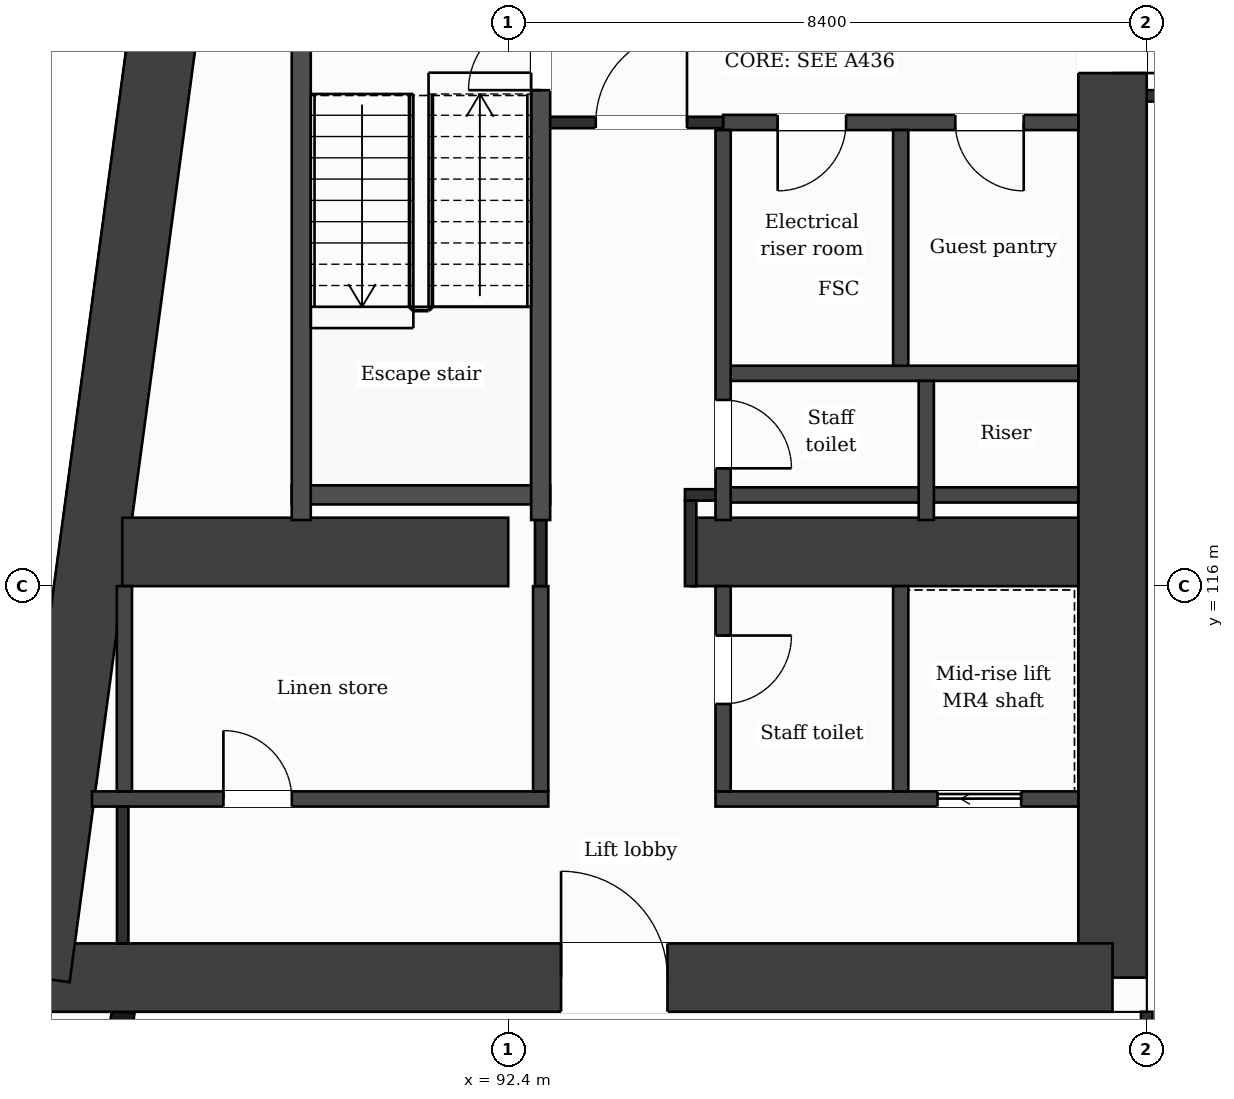
"""IFC4 building model, lengths in metres.
Left out: names, types, materials, properties, quantities, classifications, styles, units other than length and angle.
Written with IfcOpenShell. Run it as: python <this file> out.ifc"""

import sys

from ifc_helpers import new_model, si_unit, direction, frame, frame_2d, origin, place, context, subcontext, project, spatial, rectangle, extrude, element, fill, save


model = new_model("IFC4")
c1 = context("Model", 3, precision=1e-05, world=origin(), true_north=direction((0.0, 1.0)))
c2 = subcontext(c1, "Body", "Model", "MODEL_VIEW")
j1 = project(units=[si_unit("LENGTHUNIT", "METRE"), si_unit("PLANEANGLEUNIT", "RADIAN")], contexts=[c1])
p1 = place(None, origin())
s1 = spatial("IfcSite", under=j1, at=p1, CompositionType="ELEMENT")
p2 = place(p1, origin())
s2 = spatial("IfcBuilding", under=s1, at=p2, CompositionType="ELEMENT")
p3 = place(p2, frame((0.0, 0.0, 151.5)))
s3 = spatial("IfcBuildingStorey", under=s2, at=p3, CompositionType="ELEMENT", Elevation=151.5)
p4 = place(p3, frame((100.35, 131.95, 0.0), z_axis=(0.0, 0.0, 1.0), x_axis=(0.0, -1.0, 0.0)))
e1 = element("IfcWall", 1, at=p4, inside=s3, PredefinedType="SHEAR", context=c2, shape_type="SweptSolid", body=[
    extrude(rectangle(XDim=21.1, YDim=0.9, at=frame_2d((10.55, 0.0))), origin(), (0.0, 0.0, 1.0), 3.7),
])
p5 = place(p4, frame((7.8, 0.0, 0.0)))
e2 = element("IfcOpeningElement", 2, at=p5, cuts=e1, PredefinedType="OPENING", context=c2, shape_type="SweptSolid", body=[
    extrude(rectangle(XDim=1.4, YDim=2.1, at=frame_2d((0.7, 1.05))), frame((0.0, 0.46, 0.0), z_axis=(0.0, -1.0, 0.0), x_axis=(1.0, 0.0, 0.0)), (0.0, 0.0, 1.0), 0.92),
])
p6 = place(p3, frame((100.35, 110.85, 0.0), z_axis=(0.0, 0.0, 1.0), x_axis=(-1.0, 0.0, 0.0)))
e3 = element("IfcWall", 3, at=p6, inside=s3, PredefinedType="SHEAR", context=c2, shape_type="SweptSolid", body=[
    extrude(rectangle(XDim=14.166, YDim=0.9, at=frame_2d((7.083, 0.0))), origin(), (0.0, 0.0, 1.0), 3.7),
])
p7 = place(p6, frame((5.855, 0.0, 0.0)))
e4 = element("IfcOpeningElement", 4, at=p7, cuts=e3, PredefinedType="OPENING", context=c2, shape_type="SweptSolid", body=[
    extrude(rectangle(XDim=1.4, YDim=2.1, at=frame_2d((0.7, 1.05))), frame((0.0, 0.46, 0.0), z_axis=(0.0, -1.0, 0.0), x_axis=(1.0, 0.0, 0.0)), (0.0, 0.0, 1.0), 0.92),
])
p8 = place(p3, frame((86.184, 110.85, 0.0), z_axis=(0.0, 0.0, 1.0), x_axis=(0.133410495943, 0.991060865725, 0.0)))
e5 = element("IfcWall", 5, at=p8, inside=s3, PredefinedType="SHEAR", context=c2, shape_type="SweptSolid", body=[
    extrude(rectangle(XDim=21.29, YDim=0.9, at=frame_2d((10.645, 0.0))), origin(), (0.0, 0.0, 1.0), 3.7),
])
p9 = place(p3, frame((87.323, 116.45, 0.0), z_axis=(0.0, 0.0, 1.0), x_axis=(1.0, 0.0, 0.0)))
e6 = element("IfcWall", 6, at=p9, inside=s3, PredefinedType="SHEAR", context=c2, shape_type="SweptSolid", body=[
    extrude(rectangle(XDim=5.077, YDim=0.9, at=frame_2d((2.539, 0.0))), origin(), (0.0, 0.0, 1.0), 3.7),
])
p10 = place(p3, frame((94.8, 116.45, 0.0), z_axis=(0.0, 0.0, 1.0), x_axis=(1.0, 0.0, 0.0)))
e7 = element("IfcWall", 7, at=p10, inside=s3, PredefinedType="SHEAR", context=c2, shape_type="SweptSolid", body=[
    extrude(rectangle(XDim=5.1, YDim=0.9, at=frame_2d((2.55, 0.0))), origin(), (0.0, 0.0, 1.0), 3.7),
])
p11 = place(p3, frame((87.334, 110.4, 0.0), z_axis=(0.0, 0.0, 1.0), x_axis=(-0.133437175554, -0.991057273915, 0.0)))
e8 = element("IfcWall", 8, at=p11, inside=s3, PredefinedType="SOLIDWALL", context=c2, shape_type="SweptSolid", body=[
    extrude(rectangle(XDim=6.781, YDim=0.3, at=frame_2d((3.39, 0.0))), origin(), (0.0, 0.0, 1.0), 3.38),
])
p12 = place(p11, frame((1.418, 0.0, 0.0)))
e9 = element("IfcOpeningElement", 9, at=p12, cuts=e8, PredefinedType="OPENING", context=c2, shape_type="SweptSolid", body=[
    extrude(rectangle(XDim=1.2, YDim=2.4, at=frame_2d((0.6, 1.2))), frame((0.0, 0.16, 0.0), z_axis=(0.0, -1.0, 0.0), x_axis=(1.0, 0.0, 0.0)), (0.0, 0.0, 1.0), 0.32),
])
p13 = place(p11, frame((4.758, 0.0, 0.9)))
e10 = element("IfcOpeningElement", 10, at=p13, cuts=e8, PredefinedType="OPENING", context=c2, shape_type="SweptSolid", body=[
    extrude(rectangle(XDim=1.2, YDim=2.1, at=frame_2d((0.6, 1.05))), frame((0.0, 0.16, 0.0), z_axis=(0.0, -1.0, 0.0), x_axis=(1.0, 0.0, 0.0)), (0.0, 0.0, 1.0), 0.32),
])
p14 = place(p3, frame((86.924, 113.2, 0.0), z_axis=(0.0, 0.0, 1.0), x_axis=(1.0, 0.0, 0.0)))
e11 = element("IfcWall", 11, at=p14, inside=s3, PredefinedType="PARTITIONING", context=c2, shape_type="SweptSolid", body=[
    extrude(rectangle(XDim=6.003, YDim=0.2, at=frame_2d((3.001, 0.0))), origin(), (0.0, 0.0, 1.0), 3.38),
])
p15 = place(p14, frame((1.729, 0.0, 0.0)))
e12 = element("IfcOpeningElement", 12, at=p15, cuts=e11, PredefinedType="OPENING", context=c2, shape_type="SweptSolid", body=[
    extrude(rectangle(XDim=0.9, YDim=2.1, at=frame_2d((0.45, 1.05))), frame((0.0, 0.11, 0.0), z_axis=(0.0, -1.0, 0.0), x_axis=(1.0, 0.0, 0.0)), (0.0, 0.0, 1.0), 0.22),
])
p16 = place(p3, frame((95.127, 113.2, 0.0), z_axis=(0.0, 0.0, 1.0), x_axis=(1.0, 0.0, 0.0)))
e13 = element("IfcWall", 13, at=p16, inside=s3, PredefinedType="PARTITIONING", context=c2, shape_type="SweptSolid", body=[
    extrude(rectangle(XDim=4.773, YDim=0.2, at=frame_2d((2.386, 0.0))), origin(), (0.0, 0.0, 1.0), 3.38),
])
p17 = place(p16, frame((2.921, 0.0, 0.0)))
e14 = element("IfcOpeningElement", 14, at=p17, cuts=e13, PredefinedType="OPENING", context=c2, shape_type="SweptSolid", body=[
    extrude(rectangle(XDim=1.1, YDim=2.1, at=frame_2d((0.55, 1.05))), frame((0.0, 0.11, 0.0), z_axis=(0.0, -1.0, 0.0), x_axis=(1.0, 0.0, 0.0)), (0.0, 0.0, 1.0), 0.22),
])
p18 = place(p3, frame((95.227, 117.2, 0.0), z_axis=(0.0, 0.0, 1.0), x_axis=(1.0, 0.0, 0.0)))
e15 = element("IfcWall", 15, at=p18, inside=s3, PredefinedType="PARTITIONING", context=c2, shape_type="SweptSolid", body=[
    extrude(rectangle(XDim=4.673, YDim=0.2, at=frame_2d((2.336, 0.0))), origin(), (0.0, 0.0, 1.0), 3.38),
])
p19 = place(p3, frame((94.725, 117.2, 0.0), z_axis=(0.0, 0.0, 1.0), x_axis=(1.0, 0.0, 0.0)))
e16 = element("IfcWall", 16, at=p19, inside=s3, PredefinedType="PARTITIONING", context=c2, shape_type="SweptSolid", body=[
    extrude(rectangle(XDim=0.502, YDim=0.15, at=frame_2d((0.251, 0.0))), origin(), (0.0, 0.0, 1.0), 3.38),
])
p20 = place(p3, frame((89.552, 117.2, 0.0), z_axis=(0.0, 0.0, 1.0), x_axis=(1.0, 0.0, 0.0)))
e17 = element("IfcWall", 17, at=p20, inside=s3, PredefinedType="PARTITIONING", context=c2, shape_type="SweptSolid", body=[
    extrude(rectangle(XDim=3.4, YDim=0.25, at=frame_2d((1.7, 0.0))), origin(), (0.0, 0.0, 1.0), 3.38),
])
p21 = place(p3, frame((95.227, 118.8, 0.0), z_axis=(0.0, 0.0, 1.0), x_axis=(1.0, 0.0, 0.0)))
e18 = element("IfcWall", 18, at=p21, inside=s3, PredefinedType="PARTITIONING", context=c2, shape_type="SweptSolid", body=[
    extrude(rectangle(XDim=4.673, YDim=0.2, at=frame_2d((2.336, 0.0))), origin(), (0.0, 0.0, 1.0), 3.38),
])
p22 = place(p3, frame((95.227, 122.1, 0.0), z_axis=(0.0, 0.0, 1.0), x_axis=(1.0, 0.0, 0.0)))
e19 = element("IfcWall", 19, at=p22, inside=s3, PredefinedType="PARTITIONING", context=c2, shape_type="SweptSolid", body=[
    extrude(rectangle(XDim=4.673, YDim=0.2, at=frame_2d((2.336, 0.0))), origin(), (0.0, 0.0, 1.0), 3.38),
])
p23 = place(p22, frame((0.718, 0.0, 0.0)))
e20 = element("IfcOpeningElement", 20, at=p23, cuts=e19, PredefinedType="OPENING", context=c2, shape_type="SweptSolid", body=[
    extrude(rectangle(XDim=0.9, YDim=2.1, at=frame_2d((0.45, 1.05))), frame((0.0, 0.11, 0.0), z_axis=(0.0, -1.0, 0.0), x_axis=(1.0, 0.0, 0.0)), (0.0, 0.0, 1.0), 0.22),
])
p24 = place(p22, frame((3.055, 0.0, 0.0)))
e21 = element("IfcOpeningElement", 21, at=p24, cuts=e19, PredefinedType="OPENING", context=c2, shape_type="SweptSolid", body=[
    extrude(rectangle(XDim=0.9, YDim=2.1, at=frame_2d((0.45, 1.05))), frame((0.0, 0.11, 0.0), z_axis=(0.0, -1.0, 0.0), x_axis=(1.0, 0.0, 0.0)), (0.0, 0.0, 1.0), 0.22),
])
p25 = place(p3, frame((92.827, 122.1, 0.0), z_axis=(0.0, 0.0, 1.0), x_axis=(1.0, 0.0, 0.0)))
e22 = element("IfcWall", 22, at=p25, inside=s3, PredefinedType="PARTITIONING", context=c2, shape_type="SweptSolid", body=[
    extrude(rectangle(XDim=2.4, YDim=0.15, at=frame_2d((1.2, 0.0))), origin(), (0.0, 0.0, 1.0), 3.38),
])
p26 = place(p25, frame((0.725, 0.0, 0.0)))
e23 = element("IfcOpeningElement", 23, at=p26, cuts=e22, PredefinedType="OPENING", context=c2, shape_type="SweptSolid", body=[
    extrude(rectangle(XDim=1.2, YDim=2.1, at=frame_2d((0.6, 1.05))), frame((0.0, 0.085, 0.0), z_axis=(0.0, -1.0, 0.0), x_axis=(1.0, 0.0, 0.0)), (0.0, 0.0, 1.0), 0.17),
])
p27 = place(p3, frame((100.8, 122.45, 0.0), z_axis=(0.0, 0.0, 1.0), x_axis=(1.0, 0.0, 0.0)))
e24 = element("IfcWall", 24, at=p27, inside=s3, PredefinedType="PARTITIONING", context=c2, shape_type="SweptSolid", body=[
    extrude(rectangle(XDim=25.2, YDim=0.15, at=frame_2d((12.6, 0.0))), origin(), (0.0, 0.0, 1.0), 3.38),
])
p28 = place(p3, frame((87.35, 113.3, 0.0), z_axis=(0.0, 0.0, 1.0), x_axis=(0.0, 1.0, 0.0)))
e25 = element("IfcWall", 25, at=p28, inside=s3, PredefinedType="PARTITIONING", context=c2, shape_type="SweptSolid", body=[
    extrude(rectangle(XDim=2.7, YDim=0.2, at=frame_2d((1.35, 0.0))), origin(), (0.0, 0.0, 1.0), 3.38),
])
p29 = place(p3, frame((87.328, 111.3, 0.0), z_axis=(0.0, 0.0, 1.0), x_axis=(0.0, 1.0, 0.0)))
e26 = element("IfcWall", 26, at=p29, inside=s3, PredefinedType="PARTITIONING", context=c2, shape_type="SweptSolid", body=[
    extrude(rectangle(XDim=1.8, YDim=0.15, at=frame_2d((0.9, 0.0))), origin(), (0.0, 0.0, 1.0), 3.38),
])
p30 = place(p3, frame((89.677, 116.87, 0.0), z_axis=(0.0, 0.0, 1.0), x_axis=(0.0, 1.0, 0.0)))
e27 = element("IfcWall", 27, at=p30, inside=s3, PredefinedType="PARTITIONING", context=c2, shape_type="SweptSolid", body=[
    extrude(rectangle(XDim=6.955, YDim=0.25, at=frame_2d((3.478, 0.0))), origin(), (0.0, 0.0, 1.0), 3.38),
])
p31 = place(p3, frame((92.827, 113.3, 0.0), z_axis=(0.0, 0.0, 1.0), x_axis=(0.0, 1.0, 0.0)))
e28 = element("IfcWall", 28, at=p31, inside=s3, PredefinedType="PARTITIONING", context=c2, shape_type="SweptSolid", body=[
    extrude(rectangle(XDim=2.7, YDim=0.2, at=frame_2d((1.35, 0.0))), origin(), (0.0, 0.0, 1.0), 3.38),
])
p32 = place(p3, frame((92.827, 116.0, 0.0), z_axis=(0.0, 0.0, 1.0), x_axis=(0.0, 1.0, 0.0)))
e29 = element("IfcWall", 29, at=p32, inside=s3, PredefinedType="PARTITIONING", context=c2, shape_type="SweptSolid", body=[
    extrude(rectangle(XDim=0.87, YDim=0.15, at=frame_2d((0.435, 0.0))), origin(), (0.0, 0.0, 1.0), 3.38),
])
p33 = place(p3, frame((92.827, 116.87, 0.0), z_axis=(0.0, 0.0, 1.0), x_axis=(0.0, 1.0, 0.0)))
e30 = element("IfcWall", 30, at=p33, inside=s3, PredefinedType="PARTITIONING", context=c2, shape_type="SweptSolid", body=[
    extrude(rectangle(XDim=6.955, YDim=0.25, at=frame_2d((3.478, 0.0))), origin(), (0.0, 0.0, 1.0), 3.38),
])
p34 = place(p33, frame((5.655, 0.0, 0.0)))
e31 = element("IfcOpeningElement", 31, at=p34, cuts=e30, PredefinedType="OPENING", context=c2, shape_type="SweptSolid", body=[
    extrude(rectangle(XDim=0.95, YDim=2.1, at=frame_2d((0.475, 1.05))), frame((0.0, 0.135, 0.0), z_axis=(0.0, -1.0, 0.0), x_axis=(1.0, 0.0, 0.0)), (0.0, 0.0, 1.0), 0.27),
])
p35 = place(p3, frame((94.8, 116.0, 0.0), z_axis=(0.0, 0.0, 1.0), x_axis=(0.0, 1.0, 0.0)))
e32 = element("IfcWall", 32, at=p35, inside=s3, PredefinedType="PARTITIONING", context=c2, shape_type="SweptSolid", body=[
    extrude(rectangle(XDim=1.125, YDim=0.15, at=frame_2d((0.562, 0.0))), origin(), (0.0, 0.0, 1.0), 3.38),
])
p36 = place(p3, frame((95.227, 113.3, 0.0), z_axis=(0.0, 0.0, 1.0), x_axis=(0.0, 1.0, 0.0)))
e33 = element("IfcWall", 33, at=p36, inside=s3, PredefinedType="PARTITIONING", context=c2, shape_type="SweptSolid", body=[
    extrude(rectangle(XDim=2.7, YDim=0.2, at=frame_2d((1.35, 0.0))), origin(), (0.0, 0.0, 1.0), 3.38),
])
p37 = place(p36, frame((1.15, 0.0, 0.0)))
e34 = element("IfcOpeningElement", 34, at=p37, cuts=e33, PredefinedType="OPENING", context=c2, shape_type="SweptSolid", body=[
    extrude(rectangle(XDim=0.9, YDim=2.1, at=frame_2d((0.45, 1.05))), frame((0.0, 0.11, 0.0), z_axis=(0.0, -1.0, 0.0), x_axis=(1.0, 0.0, 0.0)), (0.0, 0.0, 1.0), 0.22),
])
p38 = place(p3, frame((95.227, 116.87, 0.0), z_axis=(0.0, 0.0, 1.0), x_axis=(0.0, 1.0, 0.0)))
e35 = element("IfcWall", 35, at=p38, inside=s3, PredefinedType="PARTITIONING", context=c2, shape_type="SweptSolid", body=[
    extrude(rectangle(XDim=5.13, YDim=0.2, at=frame_2d((2.565, 0.0))), origin(), (0.0, 0.0, 1.0), 3.38),
])
p39 = place(p38, frame((0.68, 0.0, 0.0)))
e36 = element("IfcOpeningElement", 36, at=p39, cuts=e35, PredefinedType="OPENING", context=c2, shape_type="SweptSolid", body=[
    extrude(rectangle(XDim=0.9, YDim=2.1, at=frame_2d((0.45, 1.05))), frame((0.0, 0.11, 0.0), z_axis=(0.0, -1.0, 0.0), x_axis=(1.0, 0.0, 0.0)), (0.0, 0.0, 1.0), 0.22),
])
p40 = place(p3, frame((97.563, 113.3, 0.0), z_axis=(0.0, 0.0, 1.0), x_axis=(0.0, 1.0, 0.0)))
e37 = element("IfcWall", 37, at=p40, inside=s3, PredefinedType="PARTITIONING", context=c2, shape_type="SweptSolid", body=[
    extrude(rectangle(XDim=2.7, YDim=0.2, at=frame_2d((1.35, 0.0))), origin(), (0.0, 0.0, 1.0), 3.38),
])
p41 = place(p3, frame((97.563, 118.9, 0.0), z_axis=(0.0, 0.0, 1.0), x_axis=(0.0, 1.0, 0.0)))
e38 = element("IfcWall", 38, at=p41, inside=s3, PredefinedType="PARTITIONING", context=c2, shape_type="SweptSolid", body=[
    extrude(rectangle(XDim=3.1, YDim=0.2, at=frame_2d((1.55, 0.0))), origin(), (0.0, 0.0, 1.0), 3.38),
])
p42 = place(p3, frame((97.9, 116.87, 0.0), z_axis=(0.0, 0.0, 1.0), x_axis=(0.0, 1.0, 0.0)))
e39 = element("IfcWall", 39, at=p42, inside=s3, PredefinedType="PARTITIONING", context=c2, shape_type="SweptSolid", body=[
    extrude(rectangle(XDim=1.83, YDim=0.2, at=frame_2d((0.915, 0.0))), origin(), (0.0, 0.0, 1.0), 3.38),
])
p43 = place(p3, frame((100.8, 109.075, 0.0), z_axis=(0.0, 0.0, 1.0), x_axis=(0.0, 1.0, 0.0)))
e40 = element("IfcWall", 40, at=p43, inside=s3, PredefinedType="PARTITIONING", context=c2, shape_type="SweptSolid", body=[
    extrude(rectangle(XDim=1.325, YDim=0.15, at=frame_2d((0.663, 0.0))), origin(), (0.0, 0.0, 1.0), 3.38),
])
p44 = place(p26, origin())
e41 = element("IfcDoor", 41, at=p44, inside=s3, OperationType="SINGLE_SWING_RIGHT", PredefinedType="DOOR", context=c2, shape_type="SweptSolid", body=[
    extrude(rectangle(XDim=1.2, YDim=2.1, at=frame_2d((0.6, 1.05))), frame((0.0, 0.025, 0.0), z_axis=(0.0, -1.0, 0.0), x_axis=(1.0, 0.0, 0.0)), (0.0, 0.0, 1.0), 0.05),
])
fill(e23, e41)
p45 = place(p23, origin())
e42 = element("IfcDoor", 42, at=p45, inside=s3, OperationType="SINGLE_SWING_LEFT", PredefinedType="DOOR", context=c2, shape_type="SweptSolid", body=[
    extrude(rectangle(XDim=0.9, YDim=2.1, at=frame_2d((0.45, 1.05))), frame((0.0, 0.025, 0.0), z_axis=(0.0, -1.0, 0.0), x_axis=(1.0, 0.0, 0.0)), (0.0, 0.0, 1.0), 0.05),
])
fill(e20, e42)
p46 = place(p24, origin())
e43 = element("IfcDoor", 43, at=p46, inside=s3, OperationType="SINGLE_SWING_RIGHT", PredefinedType="DOOR", context=c2, shape_type="SweptSolid", body=[
    extrude(rectangle(XDim=0.9, YDim=2.1, at=frame_2d((0.45, 1.05))), frame((0.0, 0.025, 0.0), z_axis=(0.0, -1.0, 0.0), x_axis=(1.0, 0.0, 0.0)), (0.0, 0.0, 1.0), 0.05),
])
fill(e21, e43)
p47 = place(p34, origin())
e44 = element("IfcDoor", 44, at=p47, inside=s3, OperationType="SINGLE_SWING_LEFT", PredefinedType="DOOR", context=c2, shape_type="SweptSolid", body=[
    extrude(rectangle(XDim=0.95, YDim=2.1, at=frame_2d((0.475, 1.05))), frame((0.0, 0.025, 0.0), z_axis=(0.0, -1.0, 0.0), x_axis=(1.0, 0.0, 0.0)), (0.0, 0.0, 1.0), 0.05),
])
fill(e31, e44)
p48 = place(p39, origin())
e45 = element("IfcDoor", 45, at=p48, inside=s3, OperationType="SINGLE_SWING_LEFT", PredefinedType="DOOR", context=c2, shape_type="SweptSolid", body=[
    extrude(rectangle(XDim=0.9, YDim=2.1, at=frame_2d((0.45, 1.05))), frame((0.0, 0.025, 0.0), z_axis=(0.0, -1.0, 0.0), x_axis=(1.0, 0.0, 0.0)), (0.0, 0.0, 1.0), 0.05),
])
fill(e36, e45)
p49 = place(p17, origin())
e46 = element("IfcDoor", 46, at=p49, inside=s3, OperationType="SLIDING_TO_LEFT", PredefinedType="DOOR", context=c2, shape_type="SweptSolid", body=[
    extrude(rectangle(XDim=1.1, YDim=2.1, at=frame_2d((0.55, 1.05))), frame((0.0, 0.025, 0.0), z_axis=(0.0, -1.0, 0.0), x_axis=(1.0, 0.0, 0.0)), (0.0, 0.0, 1.0), 0.05),
])
fill(e14, e46)
p50 = place(p15, origin())
e47 = element("IfcDoor", 47, at=p50, inside=s3, OperationType="SINGLE_SWING_LEFT", PredefinedType="DOOR", context=c2, shape_type="SweptSolid", body=[
    extrude(rectangle(XDim=0.9, YDim=2.1, at=frame_2d((0.45, 1.05))), frame((0.0, 0.025, 0.0), z_axis=(0.0, -1.0, 0.0), x_axis=(1.0, 0.0, 0.0)), (0.0, 0.0, 1.0), 0.05),
])
fill(e12, e47)
p51 = place(p37, origin())
e48 = element("IfcDoor", 48, at=p51, inside=s3, OperationType="SINGLE_SWING_RIGHT", PredefinedType="DOOR", context=c2, shape_type="SweptSolid", body=[
    extrude(rectangle(XDim=0.9, YDim=2.1, at=frame_2d((0.45, 1.05))), frame((0.0, 0.025, 0.0), z_axis=(0.0, -1.0, 0.0), x_axis=(1.0, 0.0, 0.0)), (0.0, 0.0, 1.0), 0.05),
])
fill(e34, e48)
p52 = place(p7, origin())
e49 = element("IfcDoor", 49, at=p52, inside=s3, OperationType="SINGLE_SWING_RIGHT", PredefinedType="DOOR", context=c2, shape_type="SweptSolid", body=[
    extrude(rectangle(XDim=1.4, YDim=2.1, at=frame_2d((0.7, 1.05))), frame((0.0, 0.025, 0.0), z_axis=(0.0, -1.0, 0.0), x_axis=(1.0, 0.0, 0.0)), (0.0, 0.0, 1.0), 0.05),
])
fill(e4, e49)
p53 = place(p5, origin())
e50 = element("IfcDoor", 50, at=p53, inside=s3, OperationType="SINGLE_SWING_RIGHT", PredefinedType="DOOR", context=c2, shape_type="SweptSolid", body=[
    extrude(rectangle(XDim=1.4, YDim=2.1, at=frame_2d((0.7, 1.05))), frame((0.0, 0.025, 0.0), z_axis=(0.0, -1.0, 0.0), x_axis=(1.0, 0.0, 0.0)), (0.0, 0.0, 1.0), 0.05),
])
fill(e2, e50)
save(model, sys.argv[1])
